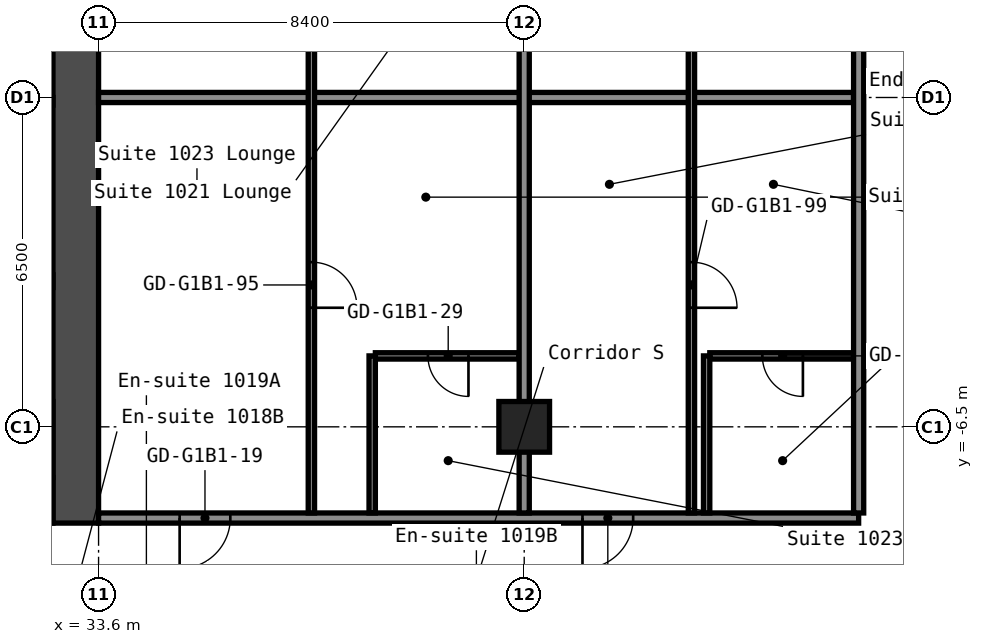
"""IFC4 building model, lengths in metres.
Left out: names, types, materials, properties, quantities, classifications, styles, units other than length and angle.
Written with IfcOpenShell. Run it as: python <this file> out.ifc"""

import sys

from ifc_helpers import new_model, si_unit, direction, frame, frame_2d, origin, origin_2d, place, context, subcontext, project, spatial, rectangle, hollow_rectangle, extrude, element, fill, save


model = new_model("IFC4")
c1 = context("Model", 3, precision=1e-05, world=origin(), true_north=direction((0.0, 1.0)))
c2 = subcontext(c1, "Body", "Model", "MODEL_VIEW")
j1 = project(units=[si_unit("LENGTHUNIT", "METRE"), si_unit("PLANEANGLEUNIT", "RADIAN")], contexts=[c1])
p1 = place(None, origin())
s1 = spatial("IfcSite", under=j1, at=p1, CompositionType="ELEMENT")
p2 = place(p1, origin())
s2 = spatial("IfcBuilding", under=s1, at=p2, CompositionType="ELEMENT")
p3 = place(p2, frame((0.0, 0.0, 39.0)))
s3 = spatial("IfcBuildingStorey", under=s2, at=p3, CompositionType="ELEMENT", Elevation=39.0)
p4 = place(p3, frame((42.0, -6.5, 0.0), z_axis=(0.0, 0.0, 1.0), x_axis=(1.0, 0.0, 0.0)))
e1 = element("IfcColumn", 1, at=p4, inside=s3, PredefinedType="COLUMN", context=c2, shape_type="SweptSolid", body=[
    extrude(hollow_rectangle(XDim=1.0, YDim=1.0, WallThickness=0.04, at=origin_2d()), origin(), (0.0, 0.0, 1.0), 2.8),
])
p5 = place(p3, frame((33.15, -8.4, 0.0), z_axis=(0.0, 0.0, 1.0), x_axis=(0.0, 1.0, 0.0)))
e2 = element("IfcWall", 2, at=p5, inside=s3, PredefinedType="SHEAR", context=c2, shape_type="SweptSolid", body=[
    extrude(rectangle(XDim=16.8, YDim=0.9, at=frame_2d((8.4, 0.0))), origin(), (0.0, 0.0, 1.0), 2.8),
])
p6 = place(p3, frame((33.6, -8.3, 0.0), z_axis=(0.0, 0.0, 1.0), x_axis=(1.0, 0.0, 0.0)))
e3 = element("IfcWall", 3, at=p6, inside=s3, PredefinedType="PARTITIONING", context=c2, shape_type="SweptSolid", body=[
    extrude(rectangle(XDim=15.0, YDim=0.2, at=frame_2d((7.5, 0.0))), origin(), (0.0, 0.0, 1.0), 2.8),
])
p7 = place(p6, frame((1.6, 0.0, 0.0)))
e4 = element("IfcOpeningElement", 4, at=p7, cuts=e3, PredefinedType="OPENING", context=c2, shape_type="SweptSolid", body=[
    extrude(rectangle(XDim=1.0, YDim=2.1, at=frame_2d((0.5, 1.05))), frame((0.0, 0.11, 0.0), z_axis=(0.0, -1.0, 0.0), x_axis=(1.0, 0.0, 0.0)), (0.0, 0.0, 1.0), 0.22),
])
p8 = place(p6, frame((9.55, 0.0, 0.0)))
e5 = element("IfcOpeningElement", 5, at=p8, cuts=e3, PredefinedType="OPENING", context=c2, shape_type="SweptSolid", body=[
    extrude(rectangle(XDim=1.0, YDim=2.1, at=frame_2d((0.5, 1.05))), frame((0.0, 0.11, 0.0), z_axis=(0.0, -1.0, 0.0), x_axis=(1.0, 0.0, 0.0)), (0.0, 0.0, 1.0), 0.22),
])
p9 = place(p3, frame((39.062, -5.1, 0.0), z_axis=(0.0, 0.0, 1.0), x_axis=(1.0, 0.0, 0.0)))
e6 = element("IfcWall", 6, at=p9, inside=s3, PredefinedType="PARTITIONING", context=c2, shape_type="SweptSolid", body=[
    extrude(rectangle(XDim=2.837, YDim=0.125, at=frame_2d((1.419, 0.0))), origin(), (0.0, 0.0, 1.0), 2.8),
])
p10 = place(p9, frame((1.038, 0.0, 0.0)))
e7 = element("IfcOpeningElement", 7, at=p10, cuts=e6, PredefinedType="OPENING", context=c2, shape_type="SweptSolid", body=[
    extrude(rectangle(XDim=0.8, YDim=2.1, at=frame_2d((0.4, 1.05))), frame((0.0, 0.073, 0.0), z_axis=(0.0, -1.0, 0.0), x_axis=(1.0, 0.0, 0.0)), (0.0, 0.0, 1.0), 0.145),
])
p11 = place(p3, frame((45.663, -5.1, 0.0), z_axis=(0.0, 0.0, 1.0), x_axis=(1.0, 0.0, 0.0)))
e8 = element("IfcWall", 8, at=p11, inside=s3, PredefinedType="PARTITIONING", context=c2, shape_type="SweptSolid", body=[
    extrude(rectangle(XDim=2.837, YDim=0.125, at=frame_2d((1.419, 0.0))), origin(), (0.0, 0.0, 1.0), 2.8),
])
p12 = place(p11, frame((1.038, 0.0, 0.0)))
e9 = element("IfcOpeningElement", 9, at=p12, cuts=e8, PredefinedType="OPENING", context=c2, shape_type="SweptSolid", body=[
    extrude(rectangle(XDim=0.8, YDim=2.1, at=frame_2d((0.4, 1.05))), frame((0.0, 0.073, 0.0), z_axis=(0.0, -1.0, 0.0), x_axis=(1.0, 0.0, 0.0)), (0.0, 0.0, 1.0), 0.145),
])
p13 = place(p3, frame((33.6, 0.0, 0.0), z_axis=(0.0, 0.0, 1.0), x_axis=(1.0, 0.0, 0.0)))
e10 = element("IfcWall", 10, at=p13, inside=s3, PredefinedType="PARTITIONING", context=c2, shape_type="SweptSolid", body=[
    extrude(rectangle(XDim=14.9, YDim=0.2, at=frame_2d((7.45, 0.0))), origin(), (0.0, 0.0, 1.0), 2.8),
])
p14 = place(p3, frame((37.8, -8.2, 0.0), z_axis=(0.0, 0.0, 1.0), x_axis=(0.0, 1.0, 0.0)))
e11 = element("IfcWall", 11, at=p14, inside=s3, PredefinedType="PARTITIONING", context=c2, shape_type="SweptSolid", body=[
    extrude(rectangle(XDim=16.4, YDim=0.125, at=frame_2d((8.2, 0.0))), origin(), (0.0, 0.0, 1.0), 2.8),
])
p15 = place(p14, frame((4.05, 0.0, 0.0)))
e12 = element("IfcOpeningElement", 12, at=p15, cuts=e11, PredefinedType="OPENING", context=c2, shape_type="SweptSolid", body=[
    extrude(rectangle(XDim=0.9, YDim=2.1, at=frame_2d((0.45, 1.05))), frame((0.0, 0.073, 0.0), z_axis=(0.0, -1.0, 0.0), x_axis=(1.0, 0.0, 0.0)), (0.0, 0.0, 1.0), 0.145),
])
p16 = place(p14, frame((11.45, 0.0, 0.0)))
e13 = element("IfcOpeningElement", 13, at=p16, cuts=e11, PredefinedType="OPENING", context=c2, shape_type="SweptSolid", body=[
    extrude(rectangle(XDim=0.9, YDim=2.1, at=frame_2d((0.45, 1.05))), frame((0.0, 0.073, 0.0), z_axis=(0.0, -1.0, 0.0), x_axis=(1.0, 0.0, 0.0)), (0.0, 0.0, 1.0), 0.145),
])
p17 = place(p3, frame((39.0, -8.2, 0.0), z_axis=(0.0, 0.0, 1.0), x_axis=(0.0, 1.0, 0.0)))
e14 = element("IfcWall", 14, at=p17, inside=s3, PredefinedType="PARTITIONING", context=c2, shape_type="SweptSolid", body=[
    extrude(rectangle(XDim=3.1, YDim=0.125, at=frame_2d((1.55, 0.0))), origin(), (0.0, 0.0, 1.0), 2.8),
])
p18 = place(p3, frame((42.0, -8.2, 0.0), z_axis=(0.0, 0.0, 1.0), x_axis=(0.0, 1.0, 0.0)))
e15 = element("IfcWall", 15, at=p18, inside=s3, PredefinedType="PARTITIONING", context=c2, shape_type="SweptSolid", body=[
    extrude(rectangle(XDim=16.4, YDim=0.2, at=frame_2d((8.2, 0.0))), origin(), (0.0, 0.0, 1.0), 2.8),
])
p19 = place(p3, frame((45.3, -8.2, 0.0), z_axis=(0.0, 0.0, 1.0), x_axis=(0.0, 1.0, 0.0)))
e16 = element("IfcWall", 16, at=p19, inside=s3, PredefinedType="PARTITIONING", context=c2, shape_type="SweptSolid", body=[
    extrude(rectangle(XDim=16.4, YDim=0.125, at=frame_2d((8.2, 0.0))), origin(), (0.0, 0.0, 1.0), 2.8),
])
p20 = place(p19, frame((4.05, 0.0, 0.0)))
e17 = element("IfcOpeningElement", 17, at=p20, cuts=e16, PredefinedType="OPENING", context=c2, shape_type="SweptSolid", body=[
    extrude(rectangle(XDim=0.9, YDim=2.1, at=frame_2d((0.45, 1.05))), frame((0.0, 0.073, 0.0), z_axis=(0.0, -1.0, 0.0), x_axis=(1.0, 0.0, 0.0)), (0.0, 0.0, 1.0), 0.145),
])
p21 = place(p19, frame((11.45, 0.0, 0.0)))
e18 = element("IfcOpeningElement", 18, at=p21, cuts=e16, PredefinedType="OPENING", context=c2, shape_type="SweptSolid", body=[
    extrude(rectangle(XDim=0.9, YDim=2.1, at=frame_2d((0.45, 1.05))), frame((0.0, 0.073, 0.0), z_axis=(0.0, -1.0, 0.0), x_axis=(1.0, 0.0, 0.0)), (0.0, 0.0, 1.0), 0.145),
])
p22 = place(p3, frame((45.6, -8.2, 0.0), z_axis=(0.0, 0.0, 1.0), x_axis=(0.0, 1.0, 0.0)))
e19 = element("IfcWall", 19, at=p22, inside=s3, PredefinedType="PARTITIONING", context=c2, shape_type="SweptSolid", body=[
    extrude(rectangle(XDim=3.1, YDim=0.125, at=frame_2d((1.55, 0.0))), origin(), (0.0, 0.0, 1.0), 2.8),
])
p23 = place(p3, frame((48.6, -8.2, 0.0), z_axis=(0.0, 0.0, 1.0), x_axis=(0.0, 1.0, 0.0)))
e20 = element("IfcWall", 20, at=p23, inside=s3, PredefinedType="PARTITIONING", context=c2, shape_type="SweptSolid", body=[
    extrude(rectangle(XDim=16.4, YDim=0.2, at=frame_2d((8.2, 0.0))), origin(), (0.0, 0.0, 1.0), 2.8),
])
p24 = place(p7, origin())
e21 = element("IfcDoor", 21, at=p24, inside=s3, OperationType="SINGLE_SWING_LEFT", PredefinedType="DOOR", context=c2, shape_type="SweptSolid", body=[
    extrude(rectangle(XDim=1.0, YDim=2.1, at=frame_2d((0.5, 1.05))), frame((0.0, 0.025, 0.0), z_axis=(0.0, -1.0, 0.0), x_axis=(1.0, 0.0, 0.0)), (0.0, 0.0, 1.0), 0.05),
])
fill(e4, e21)
p25 = place(p8, origin())
e22 = element("IfcDoor", 22, at=p25, inside=s3, OperationType="SINGLE_SWING_LEFT", PredefinedType="DOOR", context=c2, shape_type="SweptSolid", body=[
    extrude(rectangle(XDim=1.0, YDim=2.1, at=frame_2d((0.5, 1.05))), frame((0.0, 0.025, 0.0), z_axis=(0.0, -1.0, 0.0), x_axis=(1.0, 0.0, 0.0)), (0.0, 0.0, 1.0), 0.05),
])
fill(e5, e22)
p26 = place(p10, origin())
e23 = element("IfcDoor", 23, at=p26, inside=s3, OperationType="SINGLE_SWING_RIGHT", PredefinedType="DOOR", context=c2, shape_type="SweptSolid", body=[
    extrude(rectangle(XDim=0.8, YDim=2.1, at=frame_2d((0.4, 1.05))), frame((0.0, 0.025, 0.0), z_axis=(0.0, -1.0, 0.0), x_axis=(1.0, 0.0, 0.0)), (0.0, 0.0, 1.0), 0.05),
])
fill(e7, e23)
p27 = place(p12, origin())
e24 = element("IfcDoor", 24, at=p27, inside=s3, OperationType="SINGLE_SWING_RIGHT", PredefinedType="DOOR", context=c2, shape_type="SweptSolid", body=[
    extrude(rectangle(XDim=0.8, YDim=2.1, at=frame_2d((0.4, 1.05))), frame((0.0, 0.025, 0.0), z_axis=(0.0, -1.0, 0.0), x_axis=(1.0, 0.0, 0.0)), (0.0, 0.0, 1.0), 0.05),
])
fill(e9, e24)
p28 = place(p15, origin())
e25 = element("IfcDoor", 25, at=p28, inside=s3, OperationType="SINGLE_SWING_LEFT", PredefinedType="DOOR", context=c2, shape_type="SweptSolid", body=[
    extrude(rectangle(XDim=0.9, YDim=2.1, at=frame_2d((0.45, 1.05))), frame((0.0, 0.025, 0.0), z_axis=(0.0, -1.0, 0.0), x_axis=(1.0, 0.0, 0.0)), (0.0, 0.0, 1.0), 0.05),
])
fill(e12, e25)
p29 = place(p20, origin())
e26 = element("IfcDoor", 26, at=p29, inside=s3, OperationType="SINGLE_SWING_LEFT", PredefinedType="DOOR", context=c2, shape_type="SweptSolid", body=[
    extrude(rectangle(XDim=0.9, YDim=2.1, at=frame_2d((0.45, 1.05))), frame((0.0, 0.025, 0.0), z_axis=(0.0, -1.0, 0.0), x_axis=(1.0, 0.0, 0.0)), (0.0, 0.0, 1.0), 0.05),
])
fill(e17, e26)
save(model, sys.argv[1])
